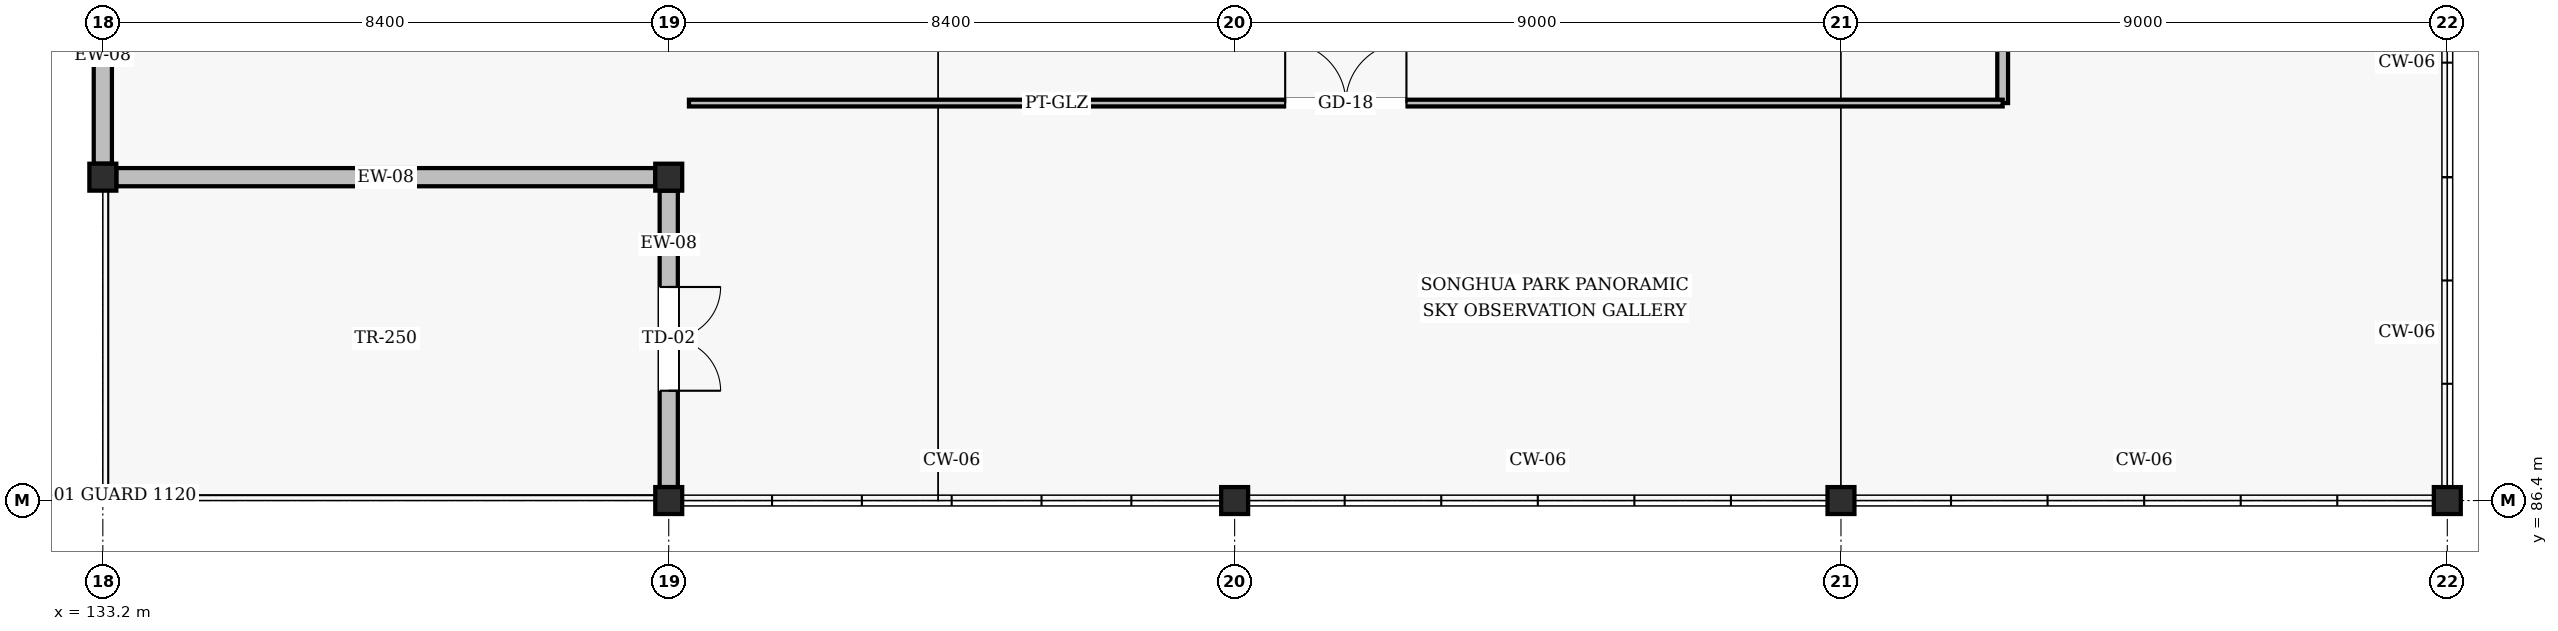
"""IFC4 building model, lengths in metres.
Left out: names, types, materials, properties, quantities, classifications, styles, units other than length and angle.
Written with IfcOpenShell. Run it as: python <this file> out.ifc"""

import sys

from ifc_helpers import new_model, si_unit, direction, frame, frame_2d, origin, origin_2d, place, context, subcontext, project, spatial, rectangle, hollow_rectangle, extrude, element, fill, save


model = new_model("IFC4")
c1 = context("Model", 3, precision=1e-05, world=origin(), true_north=direction((0.0, 1.0)))
c2 = subcontext(c1, "Body", "Model", "MODEL_VIEW")
j1 = project(units=[si_unit("LENGTHUNIT", "METRE"), si_unit("PLANEANGLEUNIT", "RADIAN")], contexts=[c1])
p1 = place(None, origin())
s1 = spatial("IfcSite", under=j1, at=p1, CompositionType="ELEMENT")
p2 = place(p1, origin())
s2 = spatial("IfcBuilding", under=s1, at=p2, CompositionType="ELEMENT")
p3 = place(p2, frame((0.0, 0.0, 57.6)))
s3 = spatial("IfcBuildingStorey", under=s2, at=p3, CompositionType="ELEMENT", Elevation=57.6)
p4 = place(p3, frame((133.2, 91.2, -0.256), z_axis=(0.0, 0.0, 1.0), x_axis=(1.0, 0.0, 0.0)))
e1 = element("IfcColumn", 1, at=p4, inside=s3, PredefinedType="COLUMN", context=c2, shape_type="SweptSolid", body=[
    extrude(hollow_rectangle(XDim=0.4, YDim=0.4, WallThickness=0.016, InnerFilletRadius=0.016, OuterFilletRadius=0.032, at=origin_2d()), origin(), (0.0, 0.0, 1.0), 3.856),
])
p5 = place(p3, frame((141.6, 86.4, 0.0), z_axis=(0.0, 0.0, 1.0), x_axis=(1.0, 0.0, 0.0)))
e2 = element("IfcColumn", 2, at=p5, inside=s3, PredefinedType="COLUMN", context=c2, shape_type="SweptSolid", body=[
    extrude(hollow_rectangle(XDim=0.4, YDim=0.4, WallThickness=0.016, InnerFilletRadius=0.016, OuterFilletRadius=0.032, at=origin_2d()), origin(), (0.0, 0.0, 1.0), 3.6),
])
p6 = place(p3, frame((141.6, 91.2, -0.256), z_axis=(0.0, 0.0, 1.0), x_axis=(1.0, 0.0, 0.0)))
e3 = element("IfcColumn", 3, at=p6, inside=s3, PredefinedType="COLUMN", context=c2, shape_type="SweptSolid", body=[
    extrude(hollow_rectangle(XDim=0.4, YDim=0.4, WallThickness=0.016, InnerFilletRadius=0.016, OuterFilletRadius=0.032, at=origin_2d()), origin(), (0.0, 0.0, 1.0), 3.856),
])
for number, where, z_axis, x_axis in (
    (4, (150.0, 86.4, 0.0), (0.0, 0.0, 1.0), (1.0, 0.0, 0.0)),
    (5, (159.0, 86.4, 0.0), (0.0, 0.0, 1.0), (1.0, 0.0, 0.0)),
    (6, (168.0, 86.4, 0.0), (0.0, 0.0, 1.0), (1.0, 0.0, 0.0)),
):
    element("IfcColumn", number, at=place(p3, frame(where, z_axis=z_axis, x_axis=x_axis)), inside=s3, PredefinedType="COLUMN", context=c2, shape_type="SweptSolid", body=[
        extrude(hollow_rectangle(XDim=0.4, YDim=0.4, WallThickness=0.016, InnerFilletRadius=0.016, OuterFilletRadius=0.032, at=origin_2d()), origin(), (0.0, 0.0, 1.0), 3.6),
    ])
p7 = place(p3, frame((133.2, 94.6, 0.0), z_axis=(0.0, 0.0, 1.0), x_axis=(0.0, -1.0, 0.0)))
e7 = element("IfcWall", 7, at=p7, inside=s3, PredefinedType="SOLIDWALL", context=c2, shape_type="SweptSolid", body=[
    extrude(rectangle(XDim=3.2, YDim=0.27, at=frame_2d((1.6, 0.0))), origin(), (0.0, 0.0, 1.0), 2.836),
])
p8 = place(p3, frame((133.4, 91.2, 0.0), z_axis=(0.0, 0.0, 1.0), x_axis=(1.0, 0.0, 0.0)))
e8 = element("IfcWall", 8, at=p8, inside=s3, PredefinedType="SOLIDWALL", context=c2, shape_type="SweptSolid", body=[
    extrude(rectangle(XDim=8.0, YDim=0.27, at=frame_2d((4.0, 0.0))), origin(), (0.0, 0.0, 1.0), 2.83),
])
p9 = place(p3, frame((141.6, 91.0, 0.0), z_axis=(0.0, 0.0, 1.0), x_axis=(0.0, -1.0, 0.0)))
e9 = element("IfcWall", 9, at=p9, inside=s3, PredefinedType="SOLIDWALL", context=c2, shape_type="SweptSolid", body=[
    extrude(rectangle(XDim=4.4, YDim=0.27, at=frame_2d((2.2, 0.0))), origin(), (0.0, 0.0, 1.0), 2.836),
])
p10 = place(p9, frame((1.43, 0.0, 0.0)))
e10 = element("IfcOpeningElement", 10, at=p10, cuts=e9, PredefinedType="OPENING", context=c2, shape_type="SweptSolid", body=[
    extrude(rectangle(XDim=1.54, YDim=2.24, at=frame_2d((0.77, 1.12))), frame((0.0, 0.145, 0.0), z_axis=(0.0, -1.0, 0.0), x_axis=(1.0, 0.0, 0.0)), (0.0, 0.0, 1.0), 0.29),
])
p11 = place(p3, frame((161.4, 92.3, 0.0), z_axis=(0.0, 0.0, 1.0), x_axis=(0.0, 1.0, 0.0)))
e11 = element("IfcWall", 11, at=p11, inside=s3, PredefinedType="PARTITIONING", context=c2, shape_type="SweptSolid", body=[
    extrude(rectangle(XDim=14.1, YDim=0.16, at=frame_2d((7.05, 0.0))), origin(), (0.0, 0.0, 1.0), 2.734),
])
p12 = place(p11, frame((6.5, 0.0, 0.0)))
e12 = element("IfcOpeningElement", 12, at=p12, cuts=e11, PredefinedType="OPENING", context=c2, shape_type="SweptSolid", body=[
    extrude(rectangle(XDim=1.08, YDim=2.08, at=frame_2d((0.54, 1.04))), frame((0.0, 0.09, 0.0), z_axis=(0.0, -1.0, 0.0), x_axis=(1.0, 0.0, 0.0)), (0.0, 0.0, 1.0), 0.18),
])
p13 = place(p3, frame((141.9, 92.3, 0.0), z_axis=(0.0, 0.0, 1.0), x_axis=(1.0, 0.0, 0.0)))
e13 = element("IfcWall", 13, at=p13, inside=s3, PredefinedType="PARTITIONING", context=c2, shape_type="SweptSolid", body=[
    extrude(rectangle(XDim=19.5, YDim=0.1, at=frame_2d((9.75, 0.0))), origin(), (0.0, 0.0, 1.0), 2.83),
])
p14 = place(p13, frame((8.85, 0.0, 0.0)))
e14 = element("IfcOpeningElement", 14, at=p14, cuts=e13, PredefinedType="OPENING", context=c2, shape_type="SweptSolid", body=[
    extrude(rectangle(XDim=1.8, YDim=2.2, at=frame_2d((0.9, 1.1))), frame((0.0, 0.06, 0.0), z_axis=(0.0, -1.0, 0.0), x_axis=(1.0, 0.0, 0.0)), (0.0, 0.0, 1.0), 0.12),
])
p15 = place(p10, frame((1.54, 0.0, 0.0), z_axis=(0.0, 0.0, 1.0), x_axis=(-1.0, 0.0, 0.0)))
e15 = element("IfcDoor", 15, at=p15, inside=s3, OperationType="DOUBLE_DOOR_SINGLE_SWING", PredefinedType="DOOR", context=c2, shape_type="SweptSolid", body=[
    extrude(rectangle(XDim=1.54, YDim=2.24, at=frame_2d((0.77, 1.12))), frame((0.0, 0.025, 0.0), z_axis=(0.0, -1.0, 0.0), x_axis=(1.0, 0.0, 0.0)), (0.0, 0.0, 1.0), 0.05),
])
fill(e10, e15)
p16 = place(p14, origin())
e16 = element("IfcDoor", 16, at=p16, inside=s3, OperationType="DOUBLE_DOOR_SINGLE_SWING", PredefinedType="DOOR", context=c2, shape_type="SweptSolid", body=[
    extrude(rectangle(XDim=1.8, YDim=2.2, at=frame_2d((0.9, 1.1))), frame((0.0, 0.025, 0.0), z_axis=(0.0, -1.0, 0.0), x_axis=(1.0, 0.0, 0.0)), (0.0, 0.0, 1.0), 0.05),
])
fill(e14, e16)
save(model, sys.argv[1])
